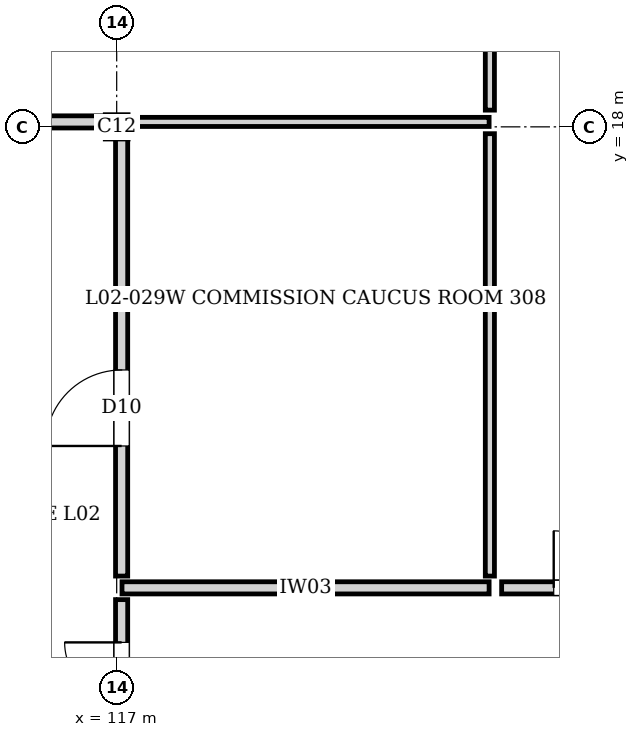
"""IFC4 building model, lengths in metres.
Left out: names, types, materials, properties, quantities, classifications, styles, units other than length and angle.
Written with IfcOpenShell. Run it as: python <this file> out.ifc"""

import sys

from ifc_helpers import new_model, si_unit, direction, frame, frame_2d, origin, origin_2d, place, context, subcontext, project, spatial, rectangle, i_section, extrude, element, fill, save


model = new_model("IFC4")
c1 = context("Model", 3, precision=1e-05, world=origin(), true_north=direction((0.0, 1.0)))
c2 = subcontext(c1, "Body", "Model", "MODEL_VIEW")
j1 = project(units=[si_unit("LENGTHUNIT", "METRE"), si_unit("PLANEANGLEUNIT", "RADIAN")], contexts=[c1])
p1 = place(None, origin())
s1 = spatial("IfcSite", under=j1, at=p1, CompositionType="ELEMENT")
p2 = place(p1, origin())
s2 = spatial("IfcBuilding", under=s1, at=p2, CompositionType="ELEMENT")
p3 = place(p2, frame((0.0, 0.0, 8.16)))
s3 = spatial("IfcBuildingStorey", under=s2, at=p3, CompositionType="ELEMENT", Elevation=8.16)
p4 = place(p3, frame((117.0, 18.0, 0.0), z_axis=(0.0, 0.0, 1.0), x_axis=(1.0, 0.0, 0.0)))
e1 = element("IfcColumn", 1, at=p4, inside=s3, PredefinedType="COLUMN", context=c2, shape_type="SweptSolid", body=[
    extrude(i_section(OverallWidth=0.3, OverallDepth=0.32, WebThickness=0.011, FlangeThickness=0.021, at=origin_2d()), origin(), (0.0, 0.0, 1.0), 3.36),
])
p5 = place(p3, frame((108.145, 18.065, 0.0), z_axis=(0.0, 0.0, 1.0), x_axis=(1.0, 0.0, 0.0)))
e2 = element("IfcWall", 2, at=p5, inside=s3, PredefinedType="PARTITIONING", context=c2, shape_type="SweptSolid", body=[
    extrude(rectangle(XDim=8.915, YDim=0.16, at=frame_2d((4.458, 0.0))), origin(), (0.0, 0.0, 1.0), 2.87),
])
p6 = place(p3, frame((117.07, 11.935, 0.0), z_axis=(0.0, 0.0, 1.0), x_axis=(1.0, 0.0, 0.0)))
e3 = element("IfcWall", 3, at=p6, inside=s3, PredefinedType="PARTITIONING", context=c2, shape_type="SweptSolid", body=[
    extrude(rectangle(XDim=4.83, YDim=0.16, at=frame_2d((2.415, 0.0))), origin(), (0.0, 0.0, 1.0), 3.11),
])
p7 = place(p3, frame((117.07, 18.065, 0.0), z_axis=(0.0, 0.0, 1.0), x_axis=(1.0, 0.0, 0.0)))
e4 = element("IfcWall", 4, at=p7, inside=s3, PredefinedType="PARTITIONING", context=c2, shape_type="SweptSolid", body=[
    extrude(rectangle(XDim=4.83, YDim=0.12, at=frame_2d((2.415, 0.0))), origin(), (0.0, 0.0, 1.0), 2.8),
])
p8 = place(p3, frame((121.91, 12.09, 0.0), z_axis=(0.0, 0.0, 1.0), x_axis=(0.0, 1.0, 0.0)))
e5 = element("IfcWall", 5, at=p8, inside=s3, PredefinedType="PARTITIONING", context=c2, shape_type="SweptSolid", body=[
    extrude(rectangle(XDim=5.82, YDim=0.12, at=frame_2d((2.91, 0.0))), origin(), (0.0, 0.0, 1.0), 3.11),
])
p9 = place(p3, frame((117.065, 9.155, 0.0), z_axis=(0.0, 0.0, 1.0), x_axis=(0.0, 1.0, 0.0)))
e6 = element("IfcWall", 6, at=p9, inside=s3, PredefinedType="PARTITIONING", context=c2, shape_type="SweptSolid", body=[
    extrude(rectangle(XDim=2.625, YDim=0.16, at=frame_2d((1.312, 0.0))), origin(), (0.0, 0.0, 1.0), 2.61),
])
p10 = place(p9, frame((0.562, 0.0, 0.0)))
e7 = element("IfcOpeningElement", 7, at=p10, cuts=e6, PredefinedType="OPENING", context=c2, shape_type="SweptSolid", body=[
    extrude(rectangle(XDim=1.5, YDim=2.1, at=frame_2d((0.75, 1.05))), frame((0.0, 0.09, 0.0), z_axis=(0.0, -1.0, 0.0), x_axis=(1.0, 0.0, 0.0)), (0.0, 0.0, 1.0), 0.18),
])
p11 = place(p3, frame((117.065, 12.09, 0.0), z_axis=(0.0, 0.0, 1.0), x_axis=(0.0, 1.0, 0.0)))
e8 = element("IfcWall", 8, at=p11, inside=s3, PredefinedType="PARTITIONING", context=c2, shape_type="SweptSolid", body=[
    extrude(rectangle(XDim=5.82, YDim=0.16, at=frame_2d((2.91, 0.0))), origin(), (0.0, 0.0, 1.0), 2.61),
])
p12 = place(p11, frame((1.712, 0.0, 0.0)))
e9 = element("IfcOpeningElement", 9, at=p12, cuts=e8, PredefinedType="OPENING", context=c2, shape_type="SweptSolid", body=[
    extrude(rectangle(XDim=1.0, YDim=2.1, at=frame_2d((0.5, 1.05))), frame((0.0, 0.09, 0.0), z_axis=(0.0, -1.0, 0.0), x_axis=(1.0, 0.0, 0.0)), (0.0, 0.0, 1.0), 0.18),
])
p13 = place(p3, frame((122.065, 11.935, 0.0), z_axis=(0.0, 0.0, 1.0), x_axis=(1.0, 0.0, 0.0)))
e10 = element("IfcWall", 10, at=p13, inside=s3, PredefinedType="PARTITIONING", context=c2, shape_type="SweptSolid", body=[
    extrude(rectangle(XDim=3.835, YDim=0.16, at=frame_2d((1.917, 0.0))), origin(), (0.0, 0.0, 1.0), 3.11),
])
p14 = place(p13, frame((0.685, 0.0, 0.0)))
e11 = element("IfcOpeningElement", 11, at=p14, cuts=e10, PredefinedType="OPENING", context=c2, shape_type="SweptSolid", body=[
    extrude(rectangle(XDim=1.5, YDim=2.1, at=frame_2d((0.75, 1.05))), frame((0.0, 0.09, 0.0), z_axis=(0.0, -1.0, 0.0), x_axis=(1.0, 0.0, 0.0)), (0.0, 0.0, 1.0), 0.18),
])
p15 = place(p3, frame((121.91, 18.22, 0.0), z_axis=(0.0, 0.0, 1.0), x_axis=(0.0, 1.0, 0.0)))
e12 = element("IfcWall", 12, at=p15, inside=s3, PredefinedType="PARTITIONING", context=c2, shape_type="SweptSolid", body=[
    extrude(rectangle(XDim=8.535, YDim=0.12, at=frame_2d((4.268, 0.0))), origin(), (0.0, 0.0, 1.0), 3.11),
])
p16 = place(p15, frame((3.468, 0.0, 0.0)))
e13 = element("IfcOpeningElement", 13, at=p16, cuts=e12, PredefinedType="OPENING", context=c2, shape_type="SweptSolid", body=[
    extrude(rectangle(XDim=1.6, YDim=2.3, at=frame_2d((0.8, 1.15))), frame((0.0, 0.07, 0.0), z_axis=(0.0, -1.0, 0.0), x_axis=(1.0, 0.0, 0.0)), (0.0, 0.0, 1.0), 0.14),
])
p17 = place(p10, origin())
e14 = element("IfcDoor", 14, at=p17, inside=s3, OperationType="DOUBLE_DOOR_SINGLE_SWING", PredefinedType="DOOR", context=c2, shape_type="SweptSolid", body=[
    extrude(rectangle(XDim=1.5, YDim=2.1, at=frame_2d((0.75, 1.05))), frame((0.0, 0.025, 0.0), z_axis=(0.0, -1.0, 0.0), x_axis=(1.0, 0.0, 0.0)), (0.0, 0.0, 1.0), 0.05),
])
fill(e7, e14)
p18 = place(p12, origin())
e15 = element("IfcDoor", 15, at=p18, inside=s3, OperationType="SINGLE_SWING_LEFT", PredefinedType="DOOR", context=c2, shape_type="SweptSolid", body=[
    extrude(rectangle(XDim=1.0, YDim=2.1, at=frame_2d((0.5, 1.05))), frame((0.0, 0.025, 0.0), z_axis=(0.0, -1.0, 0.0), x_axis=(1.0, 0.0, 0.0)), (0.0, 0.0, 1.0), 0.05),
])
fill(e9, e15)
p19 = place(p14, origin())
e16 = element("IfcDoor", 16, at=p19, inside=s3, OperationType="DOUBLE_DOOR_SINGLE_SWING", PredefinedType="DOOR", context=c2, shape_type="SweptSolid", body=[
    extrude(rectangle(XDim=1.5, YDim=2.1, at=frame_2d((0.75, 1.05))), frame((0.0, 0.025, 0.0), z_axis=(0.0, -1.0, 0.0), x_axis=(1.0, 0.0, 0.0)), (0.0, 0.0, 1.0), 0.05),
])
fill(e11, e16)
save(model, sys.argv[1])
